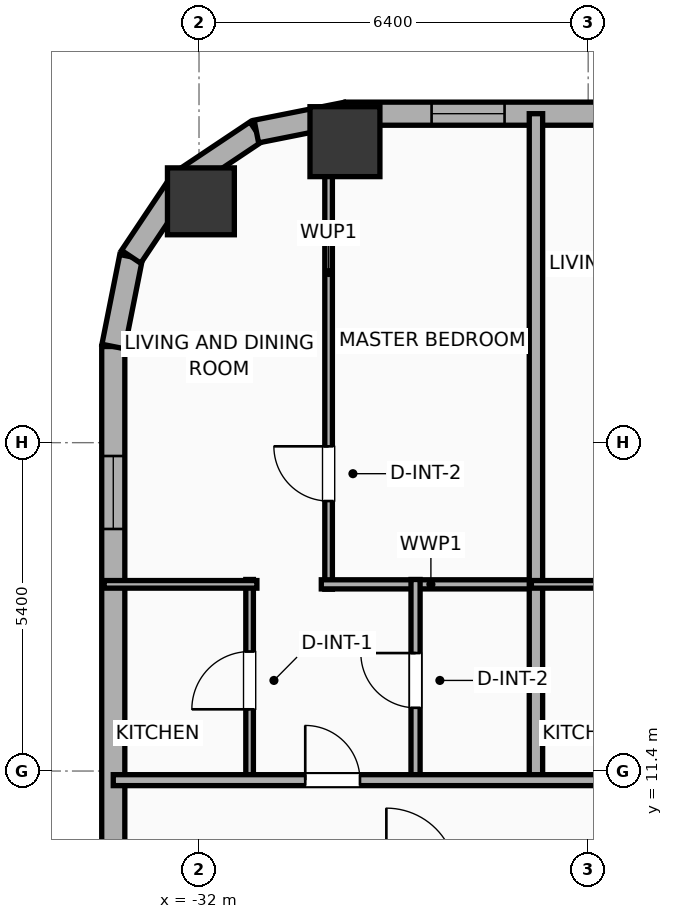
"""IFC4 building model, lengths in metres.
Left out: names, types, materials, properties, quantities, classifications, styles, units other than length and angle.
Written with IfcOpenShell. Run it as: python <this file> out.ifc"""

import sys

from ifc_helpers import new_model, si_unit, direction, frame, frame_2d, origin, origin_2d, place, context, subcontext, project, spatial, rectangle, hollow_rectangle, hollow_circle, extrude, element, fill, save


model = new_model("IFC4")
c1 = context("Model", 3, precision=1e-05, world=origin(), true_north=direction((0.0, 1.0)))
c2 = subcontext(c1, "Body", "Model", "MODEL_VIEW")
j1 = project(units=[si_unit("LENGTHUNIT", "METRE"), si_unit("PLANEANGLEUNIT", "RADIAN")], contexts=[c1])
p1 = place(None, origin())
s1 = spatial("IfcSite", under=j1, at=p1, CompositionType="ELEMENT")
p2 = place(p1, origin())
s2 = spatial("IfcBuilding", under=s1, at=p2, CompositionType="ELEMENT")
p3 = place(p2, frame((0.0, 0.0, 76.7)))
s3 = spatial("IfcBuildingStorey", under=s2, at=p3, CompositionType="ELEMENT", Elevation=76.7)
p4 = place(p3, frame((-29.6, 21.75, 0.0), z_axis=(0.0, 0.0, 1.0), x_axis=(1.0, 0.0, 0.0)))
e1 = element("IfcColumn", 1, at=p4, inside=s3, PredefinedType="COLUMN", context=c2, shape_type="SweptSolid", body=[
    extrude(hollow_rectangle(XDim=1.15, YDim=1.15, WallThickness=0.04, at=origin_2d()), origin(), (0.0, 0.0, 1.0), 3.9),
])
p5 = place(p3, frame((-31.969, 20.769, 0.0), z_axis=(0.0, 0.0, 1.0), x_axis=(1.0, 0.0, 0.0)))
e2 = element("IfcColumn", 2, at=p5, inside=s3, PredefinedType="COLUMN", context=c2, shape_type="SweptSolid", body=[
    extrude(hollow_circle(Radius=0.55, WallThickness=0.036, at=origin_2d()), origin(), (0.0, 0.0, 1.0), 3.9),
])
p6 = place(p3, frame((-33.41, -18.381, 0.0), z_axis=(0.0, 0.0, 1.0), x_axis=(0.0, 1.0, 0.0)))
e3 = element("IfcWall", 3, at=p6, inside=s3, PredefinedType="ELEMENTEDWALL", context=c2, shape_type="SweptSolid", body=[
    extrude(rectangle(XDim=36.763, YDim=0.38, at=frame_2d((18.381, 0.0))), origin(), (0.0, 0.0, 1.0), 3.6),
])
p7 = place(p6, frame((33.762, 0.0, 0.75)))
e4 = element("IfcOpeningElement", 4, at=p7, cuts=e3, PredefinedType="OPENING", context=c2, shape_type="SweptSolid", body=[
    extrude(rectangle(XDim=1.2, YDim=2.05, at=frame_2d((0.6, 1.025))), frame((0.0, 0.2, 0.0), z_axis=(0.0, -1.0, 0.0), x_axis=(1.0, 0.0, 0.0)), (0.0, 0.0, 1.0), 0.4),
])
p8 = place(p6, frame((22.701, 0.0, 0.75)))
e5 = element("IfcOpeningElement", 5, at=p8, cuts=e3, PredefinedType="OPENING", context=c2, shape_type="SweptSolid", body=[
    extrude(rectangle(XDim=1.2, YDim=2.05, at=frame_2d((0.6, 1.025))), frame((0.0, 0.2, 0.0), z_axis=(0.0, -1.0, 0.0), x_axis=(1.0, 0.0, 0.0)), (0.0, 0.0, 1.0), 0.4),
])
p9 = place(p6, frame((13.001, 0.0, 0.75)))
e6 = element("IfcOpeningElement", 6, at=p9, cuts=e3, PredefinedType="OPENING", context=c2, shape_type="SweptSolid", body=[
    extrude(rectangle(XDim=1.2, YDim=2.05, at=frame_2d((0.6, 1.025))), frame((0.0, 0.2, 0.0), z_axis=(0.0, -1.0, 0.0), x_axis=(1.0, 0.0, 0.0)), (0.0, 0.0, 1.0), 0.4),
])
p10 = place(p3, frame((-33.41, 18.381, 0.0), z_axis=(0.0, 0.0, 1.0), x_axis=(0.195086038585, 0.980786132421, 0.0)))
e7 = element("IfcWall", 7, at=p10, inside=s3, PredefinedType="ELEMENTEDWALL", context=c2, shape_type="SweptSolid", body=[
    extrude(rectangle(XDim=1.504, YDim=0.38, at=frame_2d((0.752, 0.0))), origin(), (0.0, 0.0, 1.0), 3.6),
])
p11 = place(p3, frame((-33.116, 19.857, 0.0), z_axis=(0.0, 0.0, 1.0), x_axis=(0.555572577804, 0.831468045563, 0.0)))
e8 = element("IfcWall", 8, at=p11, inside=s3, PredefinedType="ELEMENTEDWALL", context=c2, shape_type="SweptSolid", body=[
    extrude(rectangle(XDim=1.485, YDim=0.38, at=frame_2d((0.742, 0.0))), origin(), (0.0, 0.0, 1.0), 3.6),
])
p12 = place(p3, frame((-32.292, 21.091, 0.0), z_axis=(0.0, 0.0, 1.0), x_axis=(0.831442848281, 0.555610286119, 0.0)))
e9 = element("IfcWall", 9, at=p12, inside=s3, PredefinedType="ELEMENTEDWALL", context=c2, shape_type="SweptSolid", body=[
    extrude(rectangle(XDim=1.485, YDim=0.38, at=frame_2d((0.743, 0.0))), origin(), (0.0, 0.0, 1.0), 3.6),
])
p13 = place(p3, frame((-31.057, 21.917, 0.0), z_axis=(0.0, 0.0, 1.0), x_axis=(0.980786132421, 0.195086038585, 0.0)))
e10 = element("IfcWall", 10, at=p13, inside=s3, PredefinedType="ELEMENTEDWALL", context=c2, shape_type="SweptSolid", body=[
    extrude(rectangle(XDim=1.504, YDim=0.38, at=frame_2d((0.752, 0.0))), origin(), (0.0, 0.0, 1.0), 3.6),
])
p14 = place(p3, frame((-29.581, 22.21, 0.0), z_axis=(0.0, 0.0, 1.0), x_axis=(1.0, 0.0, 0.0)))
e11 = element("IfcWall", 11, at=p14, inside=s3, PredefinedType="ELEMENTEDWALL", context=c2, shape_type="SweptSolid", body=[
    extrude(rectangle(XDim=51.963, YDim=0.38, at=frame_2d((25.981, 0.0))), origin(), (0.0, 0.0, 1.0), 3.6),
])
p15 = place(p14, frame((25.631, 0.0, 0.75)))
e12 = element("IfcOpeningElement", 12, at=p15, cuts=e11, PredefinedType="OPENING", context=c2, shape_type="SweptSolid", body=[
    extrude(rectangle(XDim=2.4, YDim=2.1, at=frame_2d((1.2, 1.05))), frame((0.0, 0.2, 0.0), z_axis=(0.0, -1.0, 0.0), x_axis=(1.0, 0.0, 0.0)), (0.0, 0.0, 1.0), 0.4),
])
p16 = place(p14, frame((42.952, 0.0, 0.75)))
e13 = element("IfcOpeningElement", 13, at=p16, cuts=e11, PredefinedType="OPENING", context=c2, shape_type="SweptSolid", body=[
    extrude(rectangle(XDim=2.4, YDim=2.1, at=frame_2d((1.2, 1.05))), frame((0.0, 0.2, 0.0), z_axis=(0.0, -1.0, 0.0), x_axis=(1.0, 0.0, 0.0)), (0.0, 0.0, 1.0), 0.4),
])
p17 = place(p14, frame((1.406, 0.0, 0.75)))
e14 = element("IfcOpeningElement", 14, at=p17, cuts=e11, PredefinedType="OPENING", context=c2, shape_type="SweptSolid", body=[
    extrude(rectangle(XDim=1.2, YDim=2.05, at=frame_2d((0.6, 1.025))), frame((0.0, 0.2, 0.0), z_axis=(0.0, -1.0, 0.0), x_axis=(1.0, 0.0, 0.0)), (0.0, 0.0, 1.0), 0.4),
])
p18 = place(p14, frame((4.297, 0.0, 0.75)))
e15 = element("IfcOpeningElement", 15, at=p18, cuts=e11, PredefinedType="OPENING", context=c2, shape_type="SweptSolid", body=[
    extrude(rectangle(XDim=1.2, YDim=2.05, at=frame_2d((0.6, 1.025))), frame((0.0, 0.2, 0.0), z_axis=(0.0, -1.0, 0.0), x_axis=(1.0, 0.0, 0.0)), (0.0, 0.0, 1.0), 0.4),
])
p19 = place(p14, frame((7.776, 0.0, 0.75)))
e16 = element("IfcOpeningElement", 16, at=p19, cuts=e11, PredefinedType="OPENING", context=c2, shape_type="SweptSolid", body=[
    extrude(rectangle(XDim=1.2, YDim=2.05, at=frame_2d((0.6, 1.025))), frame((0.0, 0.2, 0.0), z_axis=(0.0, -1.0, 0.0), x_axis=(1.0, 0.0, 0.0)), (0.0, 0.0, 1.0), 0.4),
])
p20 = place(p14, frame((14.036, 0.0, 0.75)))
e17 = element("IfcOpeningElement", 17, at=p20, cuts=e11, PredefinedType="OPENING", context=c2, shape_type="SweptSolid", body=[
    extrude(rectangle(XDim=1.2, YDim=2.05, at=frame_2d((0.6, 1.025))), frame((0.0, 0.2, 0.0), z_axis=(0.0, -1.0, 0.0), x_axis=(1.0, 0.0, 0.0)), (0.0, 0.0, 1.0), 0.4),
])
p21 = place(p14, frame((11.146, 0.0, 0.75)))
e18 = element("IfcOpeningElement", 18, at=p21, cuts=e11, PredefinedType="OPENING", context=c2, shape_type="SweptSolid", body=[
    extrude(rectangle(XDim=1.2, YDim=2.05, at=frame_2d((0.6, 1.025))), frame((0.0, 0.2, 0.0), z_axis=(0.0, -1.0, 0.0), x_axis=(1.0, 0.0, 0.0)), (0.0, 0.0, 1.0), 0.4),
])
p22 = place(p14, frame((18.751, 0.0, 0.75)))
e19 = element("IfcOpeningElement", 19, at=p22, cuts=e11, PredefinedType="OPENING", context=c2, shape_type="SweptSolid", body=[
    extrude(rectangle(XDim=1.2, YDim=2.05, at=frame_2d((0.6, 1.025))), frame((0.0, 0.2, 0.0), z_axis=(0.0, -1.0, 0.0), x_axis=(1.0, 0.0, 0.0)), (0.0, 0.0, 1.0), 0.4),
])
p23 = place(p14, frame((23.647, 0.0, 0.75)))
e20 = element("IfcOpeningElement", 20, at=p23, cuts=e11, PredefinedType="OPENING", context=c2, shape_type="SweptSolid", body=[
    extrude(rectangle(XDim=1.2, YDim=2.05, at=frame_2d((0.6, 1.025))), frame((0.0, 0.2, 0.0), z_axis=(0.0, -1.0, 0.0), x_axis=(1.0, 0.0, 0.0)), (0.0, 0.0, 1.0), 0.4),
])
p24 = place(p14, frame((32.006, 0.0, 0.75)))
e21 = element("IfcOpeningElement", 21, at=p24, cuts=e11, PredefinedType="OPENING", context=c2, shape_type="SweptSolid", body=[
    extrude(rectangle(XDim=1.2, YDim=2.05, at=frame_2d((0.6, 1.025))), frame((0.0, 0.2, 0.0), z_axis=(0.0, -1.0, 0.0), x_axis=(1.0, 0.0, 0.0)), (0.0, 0.0, 1.0), 0.4),
])
p25 = place(p14, frame((34.176, 0.0, 0.75)))
e22 = element("IfcOpeningElement", 22, at=p25, cuts=e11, PredefinedType="OPENING", context=c2, shape_type="SweptSolid", body=[
    extrude(rectangle(XDim=1.2, YDim=2.05, at=frame_2d((0.6, 1.025))), frame((0.0, 0.2, 0.0), z_axis=(0.0, -1.0, 0.0), x_axis=(1.0, 0.0, 0.0)), (0.0, 0.0, 1.0), 0.4),
])
p26 = place(p14, frame((37.063, 0.0, 0.75)))
e23 = element("IfcOpeningElement", 23, at=p26, cuts=e11, PredefinedType="OPENING", context=c2, shape_type="SweptSolid", body=[
    extrude(rectangle(XDim=1.2, YDim=2.05, at=frame_2d((0.6, 1.025))), frame((0.0, 0.2, 0.0), z_axis=(0.0, -1.0, 0.0), x_axis=(1.0, 0.0, 0.0)), (0.0, 0.0, 1.0), 0.4),
])
p27 = place(p14, frame((39.509, 0.0, 0.75)))
e24 = element("IfcOpeningElement", 24, at=p27, cuts=e11, PredefinedType="OPENING", context=c2, shape_type="SweptSolid", body=[
    extrude(rectangle(XDim=1.2, YDim=2.05, at=frame_2d((0.6, 1.025))), frame((0.0, 0.2, 0.0), z_axis=(0.0, -1.0, 0.0), x_axis=(1.0, 0.0, 0.0)), (0.0, 0.0, 1.0), 0.4),
])
p28 = place(p14, frame((46.921, 0.0, 0.75)))
e25 = element("IfcOpeningElement", 25, at=p28, cuts=e11, PredefinedType="OPENING", context=c2, shape_type="SweptSolid", body=[
    extrude(rectangle(XDim=1.2, YDim=2.05, at=frame_2d((0.6, 1.025))), frame((0.0, 0.2, 0.0), z_axis=(0.0, -1.0, 0.0), x_axis=(1.0, 0.0, 0.0)), (0.0, 0.0, 1.0), 0.4),
])
p29 = place(p14, frame((49.55, 0.0, 0.75)))
e26 = element("IfcOpeningElement", 26, at=p29, cuts=e11, PredefinedType="OPENING", context=c2, shape_type="SweptSolid", body=[
    extrude(rectangle(XDim=1.2, YDim=2.05, at=frame_2d((0.6, 1.025))), frame((0.0, 0.2, 0.0), z_axis=(0.0, -1.0, 0.0), x_axis=(1.0, 0.0, 0.0)), (0.0, 0.0, 1.0), 0.4),
])
p30 = place(p3, frame((-29.869, 14.39, 0.0), z_axis=(0.0, 0.0, 1.0), x_axis=(0.0, 1.0, 0.0)))
e27 = element("IfcWall", 27, at=p30, inside=s3, PredefinedType="PARTITIONING", context=c2, shape_type="SweptSolid", body=[
    extrude(rectangle(XDim=7.916, YDim=0.125, at=frame_2d((3.958, 0.0))), origin(), (0.0, 0.0, 1.0), 3.6),
])
p31 = place(p30, frame((1.45, 0.0, 0.0)))
e28 = element("IfcOpeningElement", 28, at=p31, cuts=e27, PredefinedType="OPENING", context=c2, shape_type="SweptSolid", body=[
    extrude(rectangle(XDim=0.9, YDim=2.05, at=frame_2d((0.45, 1.025))), frame((0.0, 0.073, 0.0), z_axis=(0.0, -1.0, 0.0), x_axis=(1.0, 0.0, 0.0)), (0.0, 0.0, 1.0), 0.145),
])
p32 = place(p3, frame((-29.989, 14.47, 0.0), z_axis=(0.0, 0.0, 1.0), x_axis=(1.0, 0.0, 0.0)))
e29 = element("IfcWall", 29, at=p32, inside=s3, PredefinedType="PLUMBINGWALL", context=c2, shape_type="SweptSolid", body=[
    extrude(rectangle(XDim=3.605, YDim=0.15, at=frame_2d((1.802, 0.0))), origin(), (0.0, 0.0, 1.0), 3.6),
])
p33 = place(p3, frame((-31.168, 11.23, 0.0), z_axis=(0.0, 0.0, 1.0), x_axis=(0.0, 1.0, 0.0)))
e30 = element("IfcWall", 30, at=p33, inside=s3, PredefinedType="PARTITIONING", context=c2, shape_type="SweptSolid", body=[
    extrude(rectangle(XDim=3.32, YDim=0.125, at=frame_2d((1.66, 0.0))), origin(), (0.0, 0.0, 1.0), 3.6),
])
p34 = place(p33, frame((1.185, 0.0, 0.0)))
e31 = element("IfcOpeningElement", 31, at=p34, cuts=e30, PredefinedType="OPENING", context=c2, shape_type="SweptSolid", body=[
    extrude(rectangle(XDim=0.95, YDim=2.05, at=frame_2d((0.475, 1.025))), frame((0.0, 0.073, 0.0), z_axis=(0.0, -1.0, 0.0), x_axis=(1.0, 0.0, 0.0)), (0.0, 0.0, 1.0), 0.145),
])
p35 = place(p3, frame((-33.56, 14.47, 0.0), z_axis=(0.0, 0.0, 1.0), x_axis=(1.0, 0.0, 0.0)))
e32 = element("IfcWall", 32, at=p35, inside=s3, PredefinedType="PARTITIONING", context=c2, shape_type="SweptSolid", body=[
    extrude(rectangle(XDim=2.512, YDim=0.125, at=frame_2d((1.256, 0.0))), origin(), (0.0, 0.0, 1.0), 3.6),
])
p36 = place(p3, frame((-28.439, 11.23, 0.0), z_axis=(0.0, 0.0, 1.0), x_axis=(0.0, 1.0, 0.0)))
e33 = element("IfcWall", 33, at=p36, inside=s3, PredefinedType="PLUMBINGWALL", context=c2, shape_type="SweptSolid", body=[
    extrude(rectangle(XDim=3.32, YDim=0.15, at=frame_2d((1.66, 0.0))), origin(), (0.0, 0.0, 1.0), 3.6),
])
p37 = place(p36, frame((1.21, 0.0, 0.0)))
e34 = element("IfcOpeningElement", 34, at=p37, cuts=e33, PredefinedType="OPENING", context=c2, shape_type="SweptSolid", body=[
    extrude(rectangle(XDim=0.9, YDim=2.05, at=frame_2d((0.45, 1.025))), frame((0.0, 0.085, 0.0), z_axis=(0.0, -1.0, 0.0), x_axis=(1.0, 0.0, 0.0)), (0.0, 0.0, 1.0), 0.17),
])
p38 = place(p3, frame((-26.459, 11.17, 0.0), z_axis=(0.0, 0.0, 1.0), x_axis=(0.0, 1.0, 0.0)))
e35 = element("IfcWall", 35, at=p38, inside=s3, PredefinedType="PARTITIONING", context=c2, shape_type="SweptSolid", body=[
    extrude(rectangle(XDim=11.04, YDim=0.22, at=frame_2d((5.52, 0.0))), origin(), (0.0, 0.0, 1.0), 3.6),
])
p39 = place(p3, frame((-26.534, 14.47, 0.0), z_axis=(0.0, 0.0, 1.0), x_axis=(1.0, 0.0, 0.0)))
e36 = element("IfcWall", 36, at=p39, inside=s3, PredefinedType="PARTITIONING", context=c2, shape_type="SweptSolid", body=[
    extrude(rectangle(XDim=2.505, YDim=0.125, at=frame_2d((1.252, 0.0))), origin(), (0.0, 0.0, 1.0), 3.6),
])
p40 = place(p3, frame((-33.41, 11.25, 0.0), z_axis=(0.0, 0.0, 1.0), x_axis=(1.0, 0.0, 0.0)))
e37 = element("IfcWall", 37, at=p40, inside=s3, PredefinedType="PARTITIONING", context=c2, shape_type="SweptSolid", body=[
    extrude(rectangle(XDim=59.62, YDim=0.18, at=frame_2d((29.81, 0.0))), origin(), (0.0, 0.0, 1.0), 3.6),
])
p41 = place(p40, frame((3.157, 0.0, 0.0)))
e38 = element("IfcOpeningElement", 38, at=p41, cuts=e37, PredefinedType="OPENING", context=c2, shape_type="SweptSolid", body=[
    extrude(rectangle(XDim=0.9, YDim=2.05, at=frame_2d((0.45, 1.025))), frame((0.0, 0.1, 0.0), z_axis=(0.0, -1.0, 0.0), x_axis=(1.0, 0.0, 0.0)), (0.0, 0.0, 1.0), 0.2),
])
p42 = place(p40, frame((10.145, 0.0, 0.0)))
e39 = element("IfcOpeningElement", 39, at=p42, cuts=e37, PredefinedType="OPENING", context=c2, shape_type="SweptSolid", body=[
    extrude(rectangle(XDim=0.9, YDim=2.05, at=frame_2d((0.45, 1.025))), frame((0.0, 0.1, 0.0), z_axis=(0.0, -1.0, 0.0), x_axis=(1.0, 0.0, 0.0)), (0.0, 0.0, 1.0), 0.2),
])
p43 = place(p40, frame((17.86, 0.0, 0.0)))
e40 = element("IfcOpeningElement", 40, at=p43, cuts=e37, PredefinedType="OPENING", context=c2, shape_type="SweptSolid", body=[
    extrude(rectangle(XDim=1.15, YDim=2.05, at=frame_2d((0.575, 1.025))), frame((0.0, 0.1, 0.0), z_axis=(0.0, -1.0, 0.0), x_axis=(1.0, 0.0, 0.0)), (0.0, 0.0, 1.0), 0.2),
])
p44 = place(p40, frame((23.338, 0.0, 0.0)))
e41 = element("IfcOpeningElement", 41, at=p44, cuts=e37, PredefinedType="OPENING", context=c2, shape_type="SweptSolid", body=[
    extrude(rectangle(XDim=0.9, YDim=2.05, at=frame_2d((0.45, 1.025))), frame((0.0, 0.1, 0.0), z_axis=(0.0, -1.0, 0.0), x_axis=(1.0, 0.0, 0.0)), (0.0, 0.0, 1.0), 0.2),
])
p45 = place(p40, frame((30.719, 0.0, 0.0)))
e42 = element("IfcOpeningElement", 42, at=p45, cuts=e37, PredefinedType="OPENING", context=c2, shape_type="SweptSolid", body=[
    extrude(rectangle(XDim=1.15, YDim=2.05, at=frame_2d((0.575, 1.025))), frame((0.0, 0.1, 0.0), z_axis=(0.0, -1.0, 0.0), x_axis=(1.0, 0.0, 0.0)), (0.0, 0.0, 1.0), 0.2),
])
p46 = place(p40, frame((34.81, 0.0, 0.0)))
e43 = element("IfcOpeningElement", 43, at=p46, cuts=e37, PredefinedType="OPENING", context=c2, shape_type="SweptSolid", body=[
    extrude(rectangle(XDim=1.15, YDim=2.05, at=frame_2d((0.575, 1.025))), frame((0.0, 0.1, 0.0), z_axis=(0.0, -1.0, 0.0), x_axis=(1.0, 0.0, 0.0)), (0.0, 0.0, 1.0), 0.2),
])
p47 = place(p40, frame((42.912, 0.0, 0.0)))
e44 = element("IfcOpeningElement", 44, at=p47, cuts=e37, PredefinedType="OPENING", context=c2, shape_type="SweptSolid", body=[
    extrude(rectangle(XDim=0.9, YDim=2.05, at=frame_2d((0.45, 1.025))), frame((0.0, 0.1, 0.0), z_axis=(0.0, -1.0, 0.0), x_axis=(1.0, 0.0, 0.0)), (0.0, 0.0, 1.0), 0.2),
])
p48 = place(p40, frame((49.482, 0.0, 0.0)))
e45 = element("IfcOpeningElement", 45, at=p48, cuts=e37, PredefinedType="OPENING", context=c2, shape_type="SweptSolid", body=[
    extrude(rectangle(XDim=0.9, YDim=2.05, at=frame_2d((0.45, 1.025))), frame((0.0, 0.1, 0.0), z_axis=(0.0, -1.0, 0.0), x_axis=(1.0, 0.0, 0.0)), (0.0, 0.0, 1.0), 0.2),
])
p49 = place(p40, frame((56.088, 0.0, 0.0)))
e46 = element("IfcOpeningElement", 46, at=p49, cuts=e37, PredefinedType="OPENING", context=c2, shape_type="SweptSolid", body=[
    extrude(rectangle(XDim=0.9, YDim=2.05, at=frame_2d((0.45, 1.025))), frame((0.0, 0.1, 0.0), z_axis=(0.0, -1.0, 0.0), x_axis=(1.0, 0.0, 0.0)), (0.0, 0.0, 1.0), 0.2),
])
p50 = place(p7, origin())
e47 = element("IfcWindow", 47, at=p50, inside=s3, PartitioningType="SINGLE_PANEL", PredefinedType="WINDOW", context=c2, shape_type="SweptSolid", body=[
    extrude(rectangle(XDim=1.2, YDim=2.05, at=frame_2d((0.6, 1.025))), frame((0.0, 0.03, 0.0), z_axis=(0.0, -1.0, 0.0), x_axis=(1.0, 0.0, 0.0)), (0.0, 0.0, 1.0), 0.06),
])
fill(e4, e47)
p51 = place(p17, origin())
e48 = element("IfcWindow", 48, at=p51, inside=s3, PartitioningType="SINGLE_PANEL", PredefinedType="WINDOW", context=c2, shape_type="SweptSolid", body=[
    extrude(rectangle(XDim=1.2, YDim=2.05, at=frame_2d((0.6, 1.025))), frame((0.0, 0.03, 0.0), z_axis=(0.0, -1.0, 0.0), x_axis=(1.0, 0.0, 0.0)), (0.0, 0.0, 1.0), 0.06),
])
fill(e14, e48)
p52 = place(p31, origin())
e49 = element("IfcDoor", 49, at=p52, inside=s3, OperationType="SINGLE_SWING_RIGHT", PredefinedType="DOOR", context=c2, shape_type="SweptSolid", body=[
    extrude(rectangle(XDim=0.9, YDim=2.05, at=frame_2d((0.45, 1.025))), frame((0.0, 0.025, 0.0), z_axis=(0.0, -1.0, 0.0), x_axis=(1.0, 0.0, 0.0)), (0.0, 0.0, 1.0), 0.05),
])
fill(e28, e49)
p53 = place(p34, origin())
e50 = element("IfcDoor", 50, at=p53, inside=s3, OperationType="SINGLE_SWING_LEFT", PredefinedType="DOOR", context=c2, shape_type="SweptSolid", body=[
    extrude(rectangle(XDim=0.95, YDim=2.05, at=frame_2d((0.475, 1.025))), frame((0.0, 0.025, 0.0), z_axis=(0.0, -1.0, 0.0), x_axis=(1.0, 0.0, 0.0)), (0.0, 0.0, 1.0), 0.05),
])
fill(e31, e50)
p54 = place(p37, origin())
e51 = element("IfcDoor", 51, at=p54, inside=s3, OperationType="SINGLE_SWING_RIGHT", PredefinedType="DOOR", context=c2, shape_type="SweptSolid", body=[
    extrude(rectangle(XDim=0.9, YDim=2.05, at=frame_2d((0.45, 1.025))), frame((0.0, 0.025, 0.0), z_axis=(0.0, -1.0, 0.0), x_axis=(1.0, 0.0, 0.0)), (0.0, 0.0, 1.0), 0.05),
])
fill(e34, e51)
p55 = place(p41, origin())
e52 = element("IfcDoor", 52, at=p55, inside=s3, OperationType="SINGLE_SWING_LEFT", PredefinedType="DOOR", context=c2, shape_type="SweptSolid", body=[
    extrude(rectangle(XDim=0.9, YDim=2.05, at=frame_2d((0.45, 1.025))), frame((0.0, 0.025, 0.0), z_axis=(0.0, -1.0, 0.0), x_axis=(1.0, 0.0, 0.0)), (0.0, 0.0, 1.0), 0.05),
])
fill(e38, e52)
save(model, sys.argv[1])
